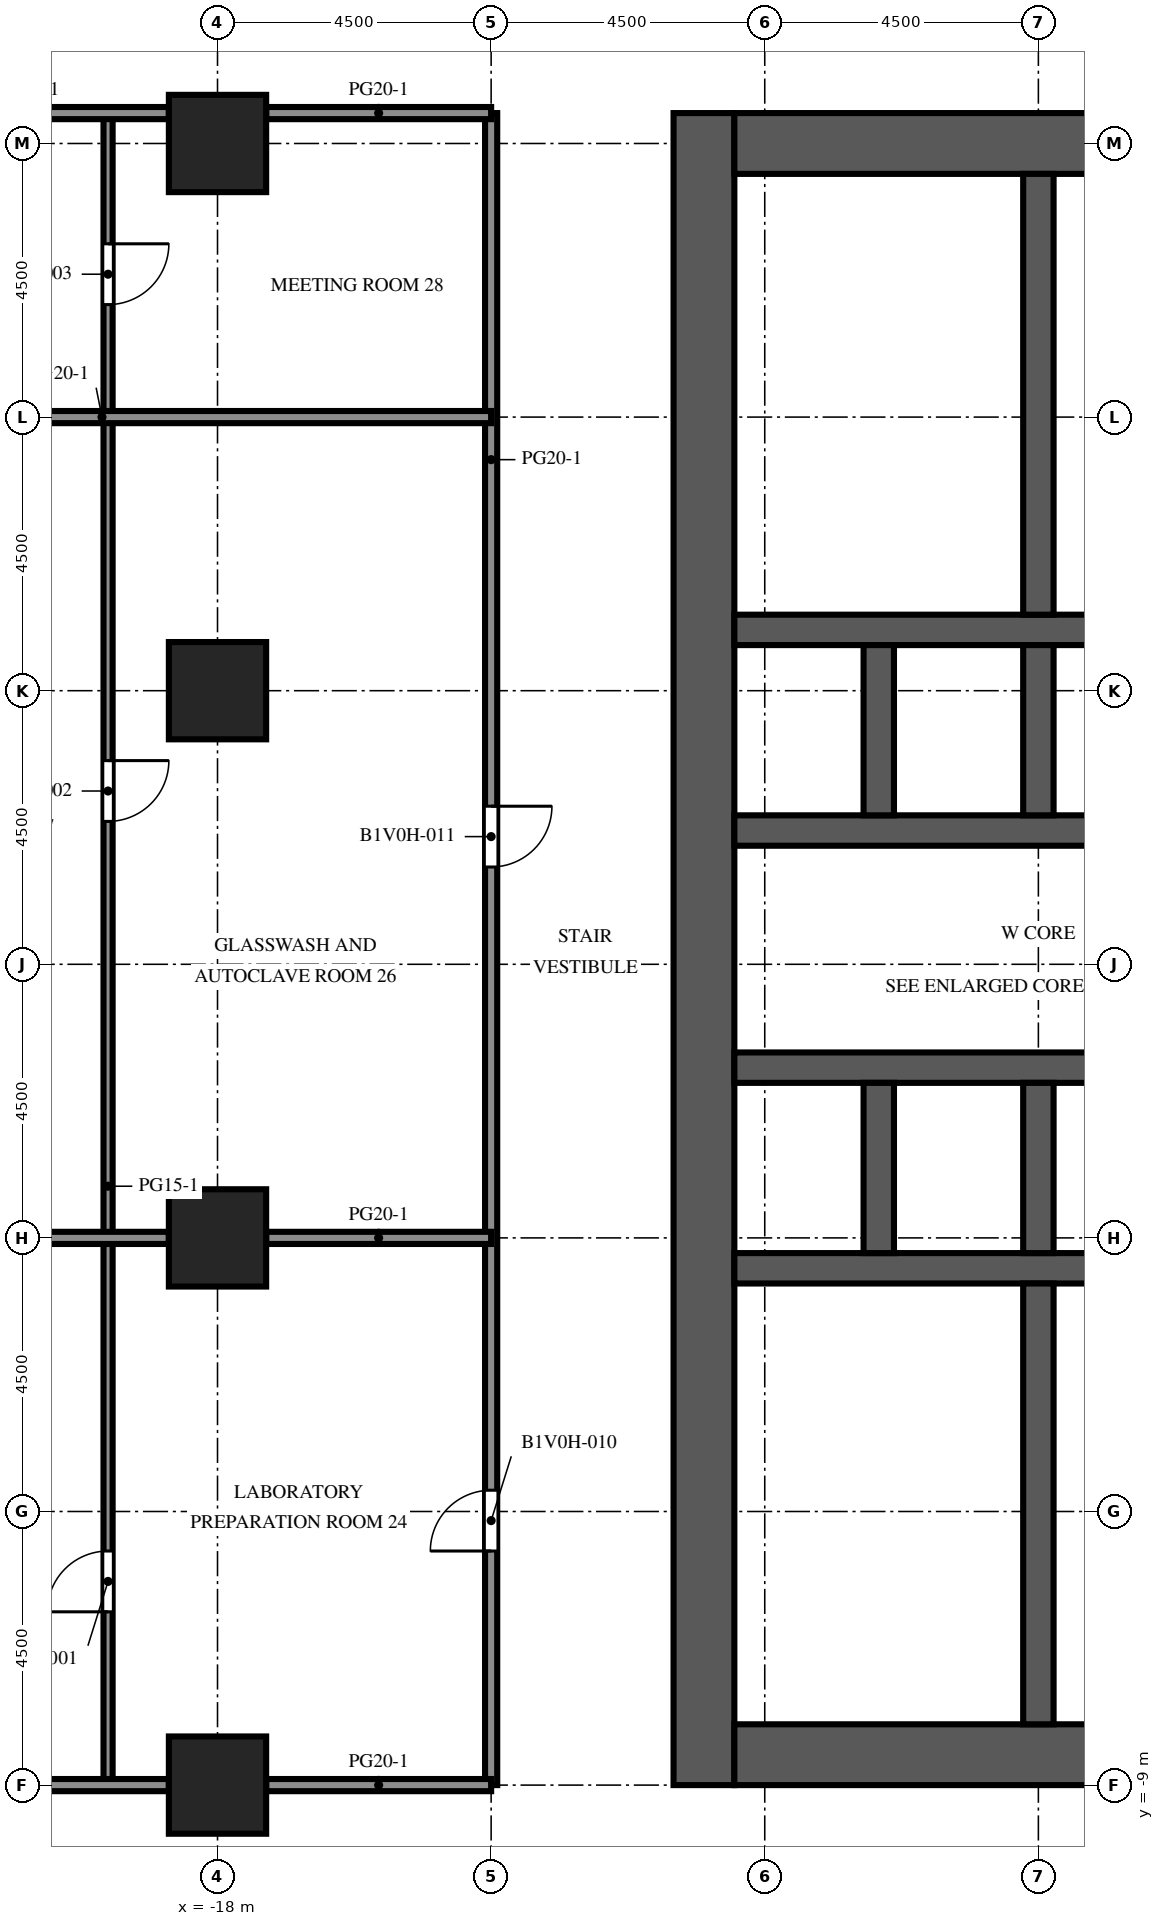
"""IFC4 building model, lengths in metres.
Left out: names, types, materials, properties, quantities, classifications, styles, units other than length and angle.
Written with IfcOpenShell. Run it as: python <this file> out.ifc"""

import sys

from ifc_helpers import new_model, si_unit, direction, frame, frame_2d, origin, origin_2d, place, context, subcontext, project, spatial, rectangle, extrude, element, fill, save


model = new_model("IFC4")
c1 = context("Model", 3, precision=1e-05, world=origin(), true_north=direction((0.0, 1.0)))
c2 = subcontext(c1, "Body", "Model", "MODEL_VIEW")
j1 = project(units=[si_unit("LENGTHUNIT", "METRE"), si_unit("PLANEANGLEUNIT", "RADIAN")], contexts=[c1])
p1 = place(None, origin())
s1 = spatial("IfcSite", under=j1, at=p1, CompositionType="ELEMENT")
p2 = place(p1, origin())
s2 = spatial("IfcBuilding", under=s1, at=p2, CompositionType="ELEMENT")
p3 = place(p2, frame((0.0, 0.0, 7.2)))
s3 = spatial("IfcBuildingStorey", under=s2, at=p3, CompositionType="ELEMENT", Elevation=7.2)
for number, where, z_axis, x_axis in (
    (1, (-18.0, -9.0, 0.0), (0.0, 0.0, 1.0), (1.0, 0.0, 0.0)),
    (2, (-18.0, 0.0, 0.0), (0.0, 0.0, 1.0), (1.0, 0.0, 0.0)),
    (3, (-18.0, 9.0, 0.0), (0.0, 0.0, 1.0), (1.0, 0.0, 0.0)),
    (4, (-18.0, 18.0, 0.0), (0.0, 0.0, 1.0), (1.0, 0.0, 0.0)),
):
    element("IfcColumn", number, at=place(p3, frame(where, z_axis=z_axis, x_axis=x_axis)), inside=s3, PredefinedType="COLUMN", context=c2, shape_type="SweptSolid", body=[
        extrude(rectangle(XDim=1.6, YDim=1.6, at=origin_2d()), origin(), (0.0, 0.0, 1.0), 4.1),
    ])
p4 = place(p3, frame((-10.0, -9.0, 0.0), z_axis=(0.0, 0.0, 1.0), x_axis=(0.0, 1.0, 0.0)))
e5 = element("IfcWall", 5, at=p4, inside=s3, PredefinedType="SHEAR", context=c2, shape_type="SweptSolid", body=[
    extrude(rectangle(XDim=27.5, YDim=1.0, at=frame_2d((13.75, 0.0))), origin(), (0.0, 0.0, 1.0), 4.1),
])
p5 = place(p4, frame((12.55, 0.0, 0.0)))
e6 = element("IfcOpeningElement", 6, at=p5, cuts=e5, PredefinedType="OPENING", context=c2, shape_type="SweptSolid", body=[
    extrude(rectangle(XDim=2.4, YDim=2.4, at=frame_2d((1.2, 1.2))), frame((0.0, 0.51, 0.0), z_axis=(0.0, -1.0, 0.0), x_axis=(1.0, 0.0, 0.0)), (0.0, 0.0, 1.0), 1.02),
])
p6 = place(p4, frame((6.825, 0.0, 0.0)))
e7 = element("IfcOpeningElement", 7, at=p6, cuts=e5, PredefinedType="OPENING", context=c2, shape_type="SweptSolid", body=[
    extrude(rectangle(XDim=1.2, YDim=2.1, at=frame_2d((0.6, 1.05))), frame((0.0, 0.51, 0.0), z_axis=(0.0, -1.0, 0.0), x_axis=(1.0, 0.0, 0.0)), (0.0, 0.0, 1.0), 1.02),
])
p7 = place(p4, frame((19.475, 0.0, 0.0)))
e8 = element("IfcOpeningElement", 8, at=p7, cuts=e5, PredefinedType="OPENING", context=c2, shape_type="SweptSolid", body=[
    extrude(rectangle(XDim=1.2, YDim=2.1, at=frame_2d((0.6, 1.05))), frame((0.0, 0.51, 0.0), z_axis=(0.0, -1.0, 0.0), x_axis=(1.0, 0.0, 0.0)), (0.0, 0.0, 1.0), 1.02),
])
for number, where, z_axis, x_axis in (
    (9, (-9.5, -8.5, 0.0), (0.0, 0.0, 1.0), (1.0, 0.0, 0.0)),
    (10, (-9.5, 18.0, 0.0), (0.0, 0.0, 1.0), (1.0, 0.0, 0.0)),
):
    element("IfcWall", number, at=place(p3, frame(where, z_axis=z_axis, x_axis=x_axis)), inside=s3, PredefinedType="SHEAR", context=c2, shape_type="SweptSolid", body=[
        extrude(rectangle(XDim=10.0, YDim=1.0, at=frame_2d((5.0, 0.0))), origin(), (0.0, 0.0, 1.0), 4.1),
    ])
p8 = place(p3, frame((-9.5, -0.5, 0.0), z_axis=(0.0, 0.0, 1.0), x_axis=(1.0, 0.0, 0.0)))
e11 = element("IfcWall", 11, at=p8, inside=s3, PredefinedType="SHEAR", context=c2, shape_type="SweptSolid", body=[
    extrude(rectangle(XDim=10.0, YDim=0.5, at=frame_2d((5.0, 0.0))), origin(), (0.0, 0.0, 1.0), 4.1),
])
p9 = place(p3, frame((-9.5, 2.8, 0.0), z_axis=(0.0, 0.0, 1.0), x_axis=(1.0, 0.0, 0.0)))
e12 = element("IfcWall", 12, at=p9, inside=s3, PredefinedType="SHEAR", context=c2, shape_type="SweptSolid", body=[
    extrude(rectangle(XDim=10.0, YDim=0.5, at=frame_2d((5.0, 0.0))), origin(), (0.0, 0.0, 1.0), 4.1),
])
p10 = place(p9, frame((0.512, 0.0, 0.0)))
e13 = element("IfcOpeningElement", 13, at=p10, cuts=e12, PredefinedType="OPENING", context=c2, shape_type="SweptSolid", body=[
    extrude(rectangle(XDim=1.1, YDim=2.1, at=frame_2d((0.55, 1.05))), frame((0.0, 0.26, 0.0), z_axis=(0.0, -1.0, 0.0), x_axis=(1.0, 0.0, 0.0)), (0.0, 0.0, 1.0), 0.52),
])
p11 = place(p9, frame((3.137, 0.0, 0.0)))
e14 = element("IfcOpeningElement", 14, at=p11, cuts=e12, PredefinedType="OPENING", context=c2, shape_type="SweptSolid", body=[
    extrude(rectangle(XDim=1.1, YDim=2.1, at=frame_2d((0.55, 1.05))), frame((0.0, 0.26, 0.0), z_axis=(0.0, -1.0, 0.0), x_axis=(1.0, 0.0, 0.0)), (0.0, 0.0, 1.0), 0.52),
])
p12 = place(p9, frame((8.387, 0.0, 0.0)))
e15 = element("IfcOpeningElement", 15, at=p12, cuts=e12, PredefinedType="OPENING", context=c2, shape_type="SweptSolid", body=[
    extrude(rectangle(XDim=1.1, YDim=2.1, at=frame_2d((0.55, 1.05))), frame((0.0, 0.26, 0.0), z_axis=(0.0, -1.0, 0.0), x_axis=(1.0, 0.0, 0.0)), (0.0, 0.0, 1.0), 0.52),
])
p13 = place(p3, frame((-9.5, 6.7, 0.0), z_axis=(0.0, 0.0, 1.0), x_axis=(1.0, 0.0, 0.0)))
e16 = element("IfcWall", 16, at=p13, inside=s3, PredefinedType="SHEAR", context=c2, shape_type="SweptSolid", body=[
    extrude(rectangle(XDim=10.0, YDim=0.5, at=frame_2d((5.0, 0.0))), origin(), (0.0, 0.0, 1.0), 4.1),
])
p14 = place(p13, frame((0.512, 0.0, 0.0)))
e17 = element("IfcOpeningElement", 17, at=p14, cuts=e16, PredefinedType="OPENING", context=c2, shape_type="SweptSolid", body=[
    extrude(rectangle(XDim=1.1, YDim=2.1, at=frame_2d((0.55, 1.05))), frame((0.0, 0.26, 0.0), z_axis=(0.0, -1.0, 0.0), x_axis=(1.0, 0.0, 0.0)), (0.0, 0.0, 1.0), 0.52),
])
p15 = place(p13, frame((3.188, 0.0, 0.0)))
e18 = element("IfcOpeningElement", 18, at=p15, cuts=e16, PredefinedType="OPENING", context=c2, shape_type="SweptSolid", body=[
    extrude(rectangle(XDim=1.0, YDim=2.1, at=frame_2d((0.5, 1.05))), frame((0.0, 0.26, 0.0), z_axis=(0.0, -1.0, 0.0), x_axis=(1.0, 0.0, 0.0)), (0.0, 0.0, 1.0), 0.52),
])
p16 = place(p13, frame((5.812, 0.0, 0.0)))
e19 = element("IfcOpeningElement", 19, at=p16, cuts=e16, PredefinedType="OPENING", context=c2, shape_type="SweptSolid", body=[
    extrude(rectangle(XDim=1.0, YDim=2.1, at=frame_2d((0.5, 1.05))), frame((0.0, 0.26, 0.0), z_axis=(0.0, -1.0, 0.0), x_axis=(1.0, 0.0, 0.0)), (0.0, 0.0, 1.0), 0.52),
])
p17 = place(p13, frame((8.438, 0.0, 0.0)))
e20 = element("IfcOpeningElement", 20, at=p17, cuts=e16, PredefinedType="OPENING", context=c2, shape_type="SweptSolid", body=[
    extrude(rectangle(XDim=1.0, YDim=2.1, at=frame_2d((0.5, 1.05))), frame((0.0, 0.26, 0.0), z_axis=(0.0, -1.0, 0.0), x_axis=(1.0, 0.0, 0.0)), (0.0, 0.0, 1.0), 0.52),
])
p18 = place(p3, frame((-9.5, 10.0, 0.0), z_axis=(0.0, 0.0, 1.0), x_axis=(1.0, 0.0, 0.0)))
e21 = element("IfcWall", 21, at=p18, inside=s3, PredefinedType="SHEAR", context=c2, shape_type="SweptSolid", body=[
    extrude(rectangle(XDim=10.0, YDim=0.5, at=frame_2d((5.0, 0.0))), origin(), (0.0, 0.0, 1.0), 4.1),
])
for number, where, z_axis, x_axis in (
    (22, (-7.125, -0.25, 0.0), (0.0, 0.0, 1.0), (0.0, 1.0, 0.0)),
    (23, (-7.125, 6.95, 0.0), (0.0, 0.0, 1.0), (0.0, 1.0, 0.0)),
    (24, (-4.5, -0.25, 0.0), (0.0, 0.0, 1.0), (0.0, 1.0, 0.0)),
    (25, (-4.5, 6.95, 0.0), (0.0, 0.0, 1.0), (0.0, 1.0, 0.0)),
):
    element("IfcWall", number, at=place(p3, frame(where, z_axis=z_axis, x_axis=x_axis)), inside=s3, PredefinedType="SHEAR", context=c2, shape_type="SweptSolid", body=[
        extrude(rectangle(XDim=2.8, YDim=0.5, at=frame_2d((1.4, 0.0))), origin(), (0.0, 0.0, 1.0), 4.1),
    ])
for number, where, z_axis, x_axis in (
    (26, (-4.5, -8.0, 0.0), (0.0, 0.0, 1.0), (0.0, 1.0, 0.0)),
    (27, (-4.5, 10.25, 0.0), (0.0, 0.0, 1.0), (0.0, 1.0, 0.0)),
):
    element("IfcWall", number, at=place(p3, frame(where, z_axis=z_axis, x_axis=x_axis)), inside=s3, PredefinedType="SHEAR", context=c2, shape_type="SweptSolid", body=[
        extrude(rectangle(XDim=7.25, YDim=0.5, at=frame_2d((3.625, 0.0))), origin(), (0.0, 0.0, 1.0), 4.1),
    ])
for number, where, z_axis, x_axis in (
    (28, (-4.25, -5.535, 0.0), (0.0, 0.0, 1.0), (1.0, 0.0, 0.0)),
    (29, (-4.25, -3.505, 0.0), (0.0, 0.0, 1.0), (1.0, 0.0, 0.0)),
):
    element("IfcWall", number, at=place(p3, frame(where, z_axis=z_axis, x_axis=x_axis)), inside=s3, PredefinedType="PARTITIONING", context=c2, shape_type="SweptSolid", body=[
        extrude(rectangle(XDim=3.25, YDim=0.1, at=frame_2d((1.625, 0.0))), origin(), (0.0, 0.0, 1.0), 3.65),
    ])
for number, where, z_axis, x_axis in (
    (30, (-4.25, 12.425, 0.0), (0.0, 0.0, 1.0), (1.0, 0.0, 0.0)),
    (31, (-4.25, 14.745, 0.0), (0.0, 0.0, 1.0), (1.0, 0.0, 0.0)),
):
    element("IfcWall", number, at=place(p3, frame(where, z_axis=z_axis, x_axis=x_axis)), inside=s3, PredefinedType="PARTITIONING", context=c2, shape_type="SweptSolid", body=[
        extrude(rectangle(XDim=3.35, YDim=0.1, at=frame_2d((1.675, 0.0))), origin(), (0.0, 0.0, 1.0), 3.65),
    ])
p19 = place(p3, frame((-19.8, -9.0, 0.0), z_axis=(0.0, 0.0, 1.0), x_axis=(0.0, 1.0, 0.0)))
e32 = element("IfcWall", 32, at=p19, inside=s3, PredefinedType="PARTITIONING", context=c2, shape_type="SweptSolid", body=[
    extrude(rectangle(XDim=27.5, YDim=0.15, at=frame_2d((13.75, 0.0))), origin(), (0.0, 0.0, 1.0), 3.65),
])
p20 = place(p19, frame((2.85, 0.0, 0.0)))
e33 = element("IfcOpeningElement", 33, at=p20, cuts=e32, PredefinedType="OPENING", context=c2, shape_type="SweptSolid", body=[
    extrude(rectangle(XDim=1.0, YDim=2.1, at=frame_2d((0.5, 1.05))), frame((0.0, 0.085, 0.0), z_axis=(0.0, -1.0, 0.0), x_axis=(1.0, 0.0, 0.0)), (0.0, 0.0, 1.0), 0.17),
])
p21 = place(p19, frame((15.85, 0.0, 0.0)))
e34 = element("IfcOpeningElement", 34, at=p21, cuts=e32, PredefinedType="OPENING", context=c2, shape_type="SweptSolid", body=[
    extrude(rectangle(XDim=1.0, YDim=2.1, at=frame_2d((0.5, 1.05))), frame((0.0, 0.085, 0.0), z_axis=(0.0, -1.0, 0.0), x_axis=(1.0, 0.0, 0.0)), (0.0, 0.0, 1.0), 0.17),
])
p22 = place(p19, frame((24.35, 0.0, 0.0)))
e35 = element("IfcOpeningElement", 35, at=p22, cuts=e32, PredefinedType="OPENING", context=c2, shape_type="SweptSolid", body=[
    extrude(rectangle(XDim=1.0, YDim=2.1, at=frame_2d((0.5, 1.05))), frame((0.0, 0.085, 0.0), z_axis=(0.0, -1.0, 0.0), x_axis=(1.0, 0.0, 0.0)), (0.0, 0.0, 1.0), 0.17),
])
p23 = place(p3, frame((-13.5, -9.0, 0.0), z_axis=(0.0, 0.0, 1.0), x_axis=(0.0, 1.0, 0.0)))
e36 = element("IfcWall", 36, at=p23, inside=s3, PredefinedType="PARTITIONING", context=c2, shape_type="SweptSolid", body=[
    extrude(rectangle(XDim=27.5, YDim=0.2, at=frame_2d((13.75, 0.0))), origin(), (0.0, 0.0, 1.0), 3.65),
])
p24 = place(p23, frame((3.85, 0.0, 0.0)))
e37 = element("IfcOpeningElement", 37, at=p24, cuts=e36, PredefinedType="OPENING", context=c2, shape_type="SweptSolid", body=[
    extrude(rectangle(XDim=1.0, YDim=2.1, at=frame_2d((0.5, 1.05))), frame((0.0, 0.11, 0.0), z_axis=(0.0, -1.0, 0.0), x_axis=(1.0, 0.0, 0.0)), (0.0, 0.0, 1.0), 0.22),
])
p25 = place(p23, frame((15.1, 0.0, 0.0)))
e38 = element("IfcOpeningElement", 38, at=p25, cuts=e36, PredefinedType="OPENING", context=c2, shape_type="SweptSolid", body=[
    extrude(rectangle(XDim=1.0, YDim=2.1, at=frame_2d((0.5, 1.05))), frame((0.0, 0.11, 0.0), z_axis=(0.0, -1.0, 0.0), x_axis=(1.0, 0.0, 0.0)), (0.0, 0.0, 1.0), 0.22),
])
p26 = place(p3, frame((-26.3, -9.0, 0.0), z_axis=(0.0, 0.0, 1.0), x_axis=(1.0, 0.0, 0.0)))
e39 = element("IfcWall", 39, at=p26, inside=s3, PredefinedType="PARTITIONING", context=c2, shape_type="SweptSolid", body=[
    extrude(rectangle(XDim=7.5, YDim=0.2, at=frame_2d((3.75, 0.0))), origin(), (0.0, 0.0, 1.0), 3.65),
])
p27 = place(p3, frame((-17.2, -9.0, 0.0), z_axis=(0.0, 0.0, 1.0), x_axis=(1.0, 0.0, 0.0)))
e40 = element("IfcWall", 40, at=p27, inside=s3, PredefinedType="PARTITIONING", context=c2, shape_type="SweptSolid", body=[
    extrude(rectangle(XDim=3.7, YDim=0.2, at=frame_2d((1.85, 0.0))), origin(), (0.0, 0.0, 1.0), 3.65),
])
p28 = place(p3, frame((-26.3, 0.0, 0.0), z_axis=(0.0, 0.0, 1.0), x_axis=(1.0, 0.0, 0.0)))
e41 = element("IfcWall", 41, at=p28, inside=s3, PredefinedType="PARTITIONING", context=c2, shape_type="SweptSolid", body=[
    extrude(rectangle(XDim=7.5, YDim=0.2, at=frame_2d((3.75, 0.0))), origin(), (0.0, 0.0, 1.0), 3.65),
])
p29 = place(p3, frame((-17.2, 0.0, 0.0), z_axis=(0.0, 0.0, 1.0), x_axis=(1.0, 0.0, 0.0)))
e42 = element("IfcWall", 42, at=p29, inside=s3, PredefinedType="PARTITIONING", context=c2, shape_type="SweptSolid", body=[
    extrude(rectangle(XDim=3.7, YDim=0.2, at=frame_2d((1.85, 0.0))), origin(), (0.0, 0.0, 1.0), 3.65),
])
p30 = place(p3, frame((-26.3, 13.5, 0.0), z_axis=(0.0, 0.0, 1.0), x_axis=(1.0, 0.0, 0.0)))
e43 = element("IfcWall", 43, at=p30, inside=s3, PredefinedType="PARTITIONING", context=c2, shape_type="SweptSolid", body=[
    extrude(rectangle(XDim=12.8, YDim=0.2, at=frame_2d((6.4, 0.0))), origin(), (0.0, 0.0, 1.0), 3.65),
])
p31 = place(p3, frame((-18.8, 18.5, 0.0), z_axis=(0.0, 0.0, 1.0), x_axis=(-1.0, 0.0, 0.0)))
e44 = element("IfcWall", 44, at=p31, inside=s3, PredefinedType="PARTITIONING", context=c2, shape_type="SweptSolid", body=[
    extrude(rectangle(XDim=7.5, YDim=0.2, at=frame_2d((3.75, 0.0))), origin(), (0.0, 0.0, 1.0), 3.65),
])
p32 = place(p31, frame((4.6, 0.0, 0.0)))
e45 = element("IfcOpeningElement", 45, at=p32, cuts=e44, PredefinedType="OPENING", context=c2, shape_type="SweptSolid", body=[
    extrude(rectangle(XDim=1.0, YDim=2.1, at=frame_2d((0.5, 1.05))), frame((0.0, 0.11, 0.0), z_axis=(0.0, -1.0, 0.0), x_axis=(1.0, 0.0, 0.0)), (0.0, 0.0, 1.0), 0.22),
])
p33 = place(p3, frame((-17.2, 18.5, 0.0), z_axis=(0.0, 0.0, 1.0), x_axis=(1.0, 0.0, 0.0)))
e46 = element("IfcWall", 46, at=p33, inside=s3, PredefinedType="PARTITIONING", context=c2, shape_type="SweptSolid", body=[
    extrude(rectangle(XDim=3.7, YDim=0.2, at=frame_2d((1.85, 0.0))), origin(), (0.0, 0.0, 1.0), 3.65),
])
p34 = place(p10, origin())
e47 = element("IfcDoor", 47, at=p34, inside=s3, OperationType="DOUBLE_DOOR_SLIDING", PredefinedType="DOOR", context=c2, shape_type="SweptSolid", body=[
    extrude(rectangle(XDim=1.1, YDim=2.1, at=frame_2d((0.55, 1.05))), frame((0.0, 0.025, 0.0), z_axis=(0.0, -1.0, 0.0), x_axis=(1.0, 0.0, 0.0)), (0.0, 0.0, 1.0), 0.05),
])
fill(e13, e47)
p35 = place(p11, origin())
e48 = element("IfcDoor", 48, at=p35, inside=s3, OperationType="DOUBLE_DOOR_SLIDING", PredefinedType="DOOR", context=c2, shape_type="SweptSolid", body=[
    extrude(rectangle(XDim=1.1, YDim=2.1, at=frame_2d((0.55, 1.05))), frame((0.0, 0.025, 0.0), z_axis=(0.0, -1.0, 0.0), x_axis=(1.0, 0.0, 0.0)), (0.0, 0.0, 1.0), 0.05),
])
fill(e14, e48)
p36 = place(p14, origin())
e49 = element("IfcDoor", 49, at=p36, inside=s3, OperationType="DOUBLE_DOOR_SLIDING", PredefinedType="DOOR", context=c2, shape_type="SweptSolid", body=[
    extrude(rectangle(XDim=1.1, YDim=2.1, at=frame_2d((0.55, 1.05))), frame((0.0, 0.025, 0.0), z_axis=(0.0, -1.0, 0.0), x_axis=(1.0, 0.0, 0.0)), (0.0, 0.0, 1.0), 0.05),
])
fill(e17, e49)
p37 = place(p5, origin())
e50 = element("IfcDoor", 50, at=p37, inside=s3, OperationType="DOUBLE_DOOR_DOUBLE_SWING", PredefinedType="DOOR", context=c2, shape_type="SweptSolid", body=[
    extrude(rectangle(XDim=2.4, YDim=2.4, at=frame_2d((1.2, 1.2))), frame((0.0, 0.025, 0.0), z_axis=(0.0, -1.0, 0.0), x_axis=(1.0, 0.0, 0.0)), (0.0, 0.0, 1.0), 0.05),
])
fill(e6, e50)
p38 = place(p6, origin())
e51 = element("IfcDoor", 51, at=p38, inside=s3, OperationType="SINGLE_SWING_LEFT", PredefinedType="DOOR", context=c2, shape_type="SweptSolid", body=[
    extrude(rectangle(XDim=1.2, YDim=2.1, at=frame_2d((0.6, 1.05))), frame((0.0, 0.025, 0.0), z_axis=(0.0, -1.0, 0.0), x_axis=(1.0, 0.0, 0.0)), (0.0, 0.0, 1.0), 0.05),
])
fill(e7, e51)
p39 = place(p7, origin())
e52 = element("IfcDoor", 52, at=p39, inside=s3, OperationType="SINGLE_SWING_LEFT", PredefinedType="DOOR", context=c2, shape_type="SweptSolid", body=[
    extrude(rectangle(XDim=1.2, YDim=2.1, at=frame_2d((0.6, 1.05))), frame((0.0, 0.025, 0.0), z_axis=(0.0, -1.0, 0.0), x_axis=(1.0, 0.0, 0.0)), (0.0, 0.0, 1.0), 0.05),
])
fill(e8, e52)
p40 = place(p15, origin())
e53 = element("IfcDoor", 53, at=p40, inside=s3, OperationType="SINGLE_SWING_RIGHT", PredefinedType="DOOR", context=c2, shape_type="SweptSolid", body=[
    extrude(rectangle(XDim=1.0, YDim=2.1, at=frame_2d((0.5, 1.05))), frame((0.0, 0.025, 0.0), z_axis=(0.0, -1.0, 0.0), x_axis=(1.0, 0.0, 0.0)), (0.0, 0.0, 1.0), 0.05),
])
fill(e18, e53)
p41 = place(p20, origin())
e54 = element("IfcDoor", 54, at=p41, inside=s3, OperationType="SINGLE_SWING_LEFT", PredefinedType="DOOR", context=c2, shape_type="SweptSolid", body=[
    extrude(rectangle(XDim=1.0, YDim=2.1, at=frame_2d((0.5, 1.05))), frame((0.0, 0.025, 0.0), z_axis=(0.0, -1.0, 0.0), x_axis=(1.0, 0.0, 0.0)), (0.0, 0.0, 1.0), 0.05),
])
fill(e33, e54)
p42 = place(p21, origin())
e55 = element("IfcDoor", 55, at=p42, inside=s3, OperationType="SINGLE_SWING_RIGHT", PredefinedType="DOOR", context=c2, shape_type="SweptSolid", body=[
    extrude(rectangle(XDim=1.0, YDim=2.1, at=frame_2d((0.5, 1.05))), frame((0.0, 0.025, 0.0), z_axis=(0.0, -1.0, 0.0), x_axis=(1.0, 0.0, 0.0)), (0.0, 0.0, 1.0), 0.05),
])
fill(e34, e55)
p43 = place(p22, origin())
e56 = element("IfcDoor", 56, at=p43, inside=s3, OperationType="SINGLE_SWING_RIGHT", PredefinedType="DOOR", context=c2, shape_type="SweptSolid", body=[
    extrude(rectangle(XDim=1.0, YDim=2.1, at=frame_2d((0.5, 1.05))), frame((0.0, 0.025, 0.0), z_axis=(0.0, -1.0, 0.0), x_axis=(1.0, 0.0, 0.0)), (0.0, 0.0, 1.0), 0.05),
])
fill(e35, e56)
p44 = place(p24, origin())
e57 = element("IfcDoor", 57, at=p44, inside=s3, OperationType="SINGLE_SWING_LEFT", PredefinedType="DOOR", context=c2, shape_type="SweptSolid", body=[
    extrude(rectangle(XDim=1.0, YDim=2.1, at=frame_2d((0.5, 1.05))), frame((0.0, 0.025, 0.0), z_axis=(0.0, -1.0, 0.0), x_axis=(1.0, 0.0, 0.0)), (0.0, 0.0, 1.0), 0.05),
])
fill(e37, e57)
p45 = place(p25, origin())
e58 = element("IfcDoor", 58, at=p45, inside=s3, OperationType="SINGLE_SWING_RIGHT", PredefinedType="DOOR", context=c2, shape_type="SweptSolid", body=[
    extrude(rectangle(XDim=1.0, YDim=2.1, at=frame_2d((0.5, 1.05))), frame((0.0, 0.025, 0.0), z_axis=(0.0, -1.0, 0.0), x_axis=(1.0, 0.0, 0.0)), (0.0, 0.0, 1.0), 0.05),
])
fill(e38, e58)
save(model, sys.argv[1])
